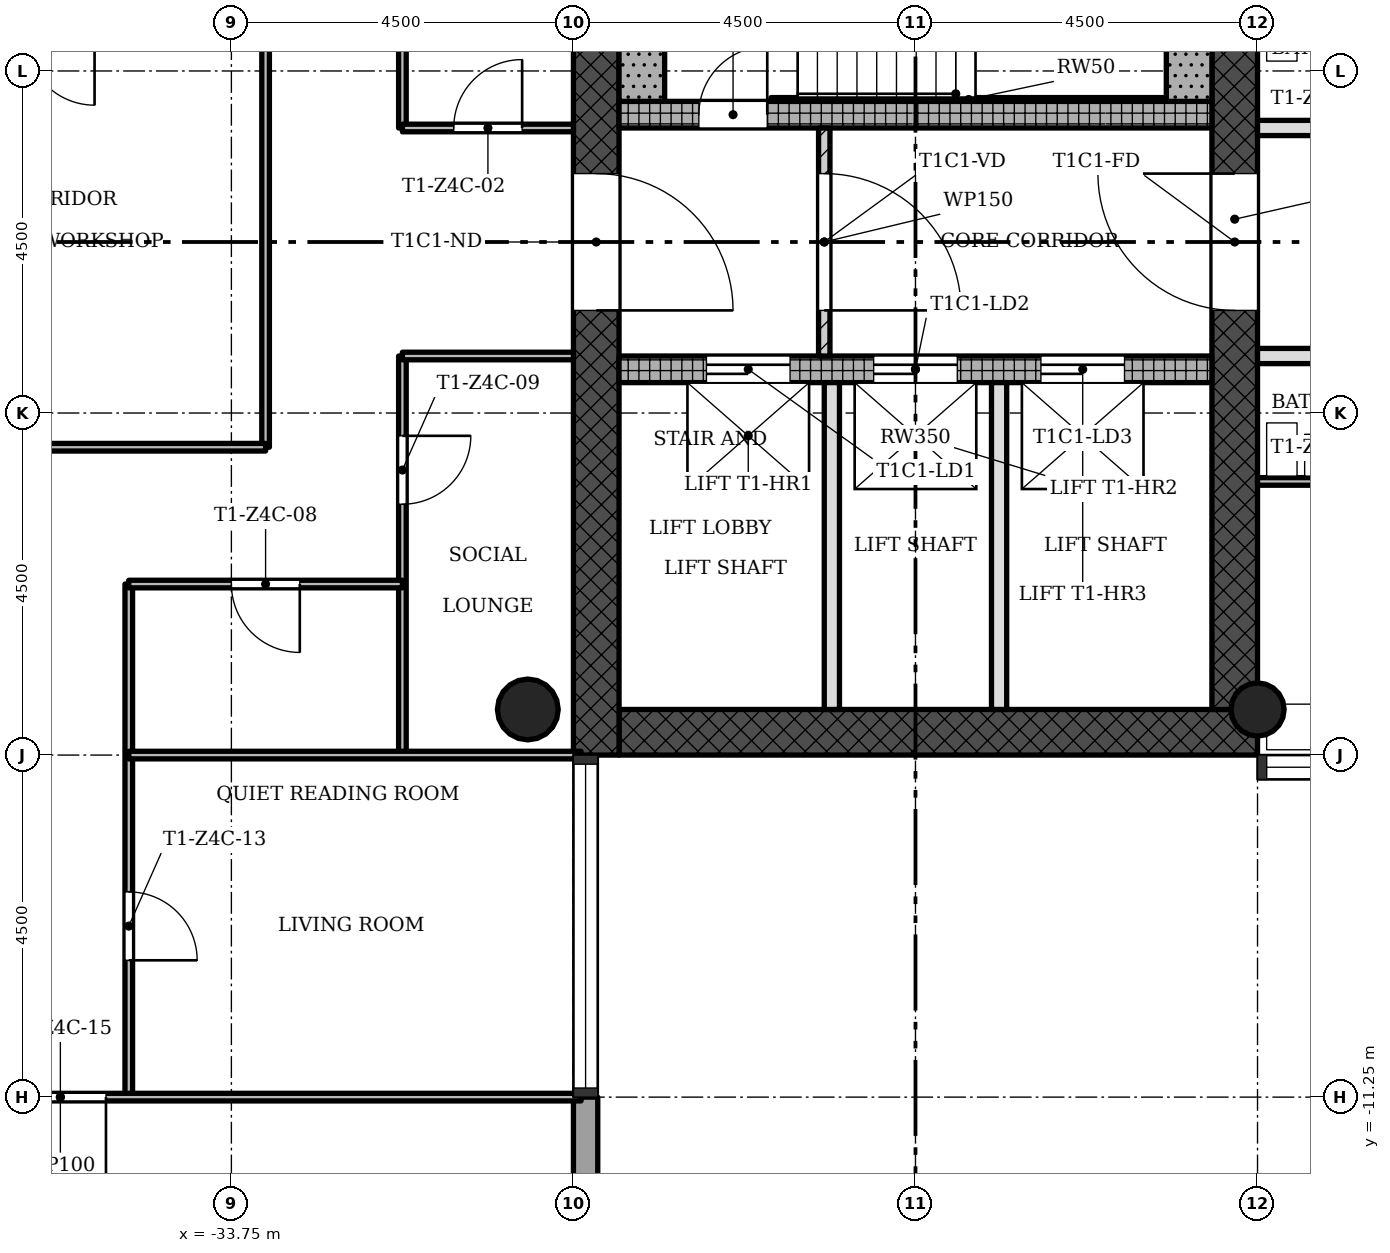
"""IFC4 building model, lengths in metres.
Left out: names, types, materials, properties, quantities, classifications, styles, units other than length and angle.
Written with IfcOpenShell. Run it as: python <this file> out.ifc"""

import sys

from ifc_helpers import new_model, si_unit, direction, frame, frame_2d, origin, origin_2d, place, context, subcontext, project, spatial, rectangle, hollow_circle, extrude, element, fill, save


model = new_model("IFC4")
c1 = context("Model", 3, precision=1e-05, world=origin(), true_north=direction((0.0, 1.0)))
c2 = subcontext(c1, "Body", "Model", "MODEL_VIEW")
j1 = project(units=[si_unit("LENGTHUNIT", "METRE"), si_unit("PLANEANGLEUNIT", "RADIAN")], contexts=[c1])
p1 = place(None, origin())
s1 = spatial("IfcSite", under=j1, at=p1, CompositionType="ELEMENT")
p2 = place(p1, origin())
s2 = spatial("IfcBuilding", under=s1, at=p2, CompositionType="ELEMENT")
p3 = place(p2, frame((0.0, 0.0, 192.6)))
s3 = spatial("IfcBuildingStorey", under=s2, at=p3, CompositionType="ELEMENT", Elevation=192.6)
p4 = place(p3, frame((-28.65, -6.45, 0.0), z_axis=(0.0, 0.0, 1.0), x_axis=(1.0, 0.0, 0.0)))
e1 = element("IfcWall", 1, at=p4, inside=s3, PredefinedType="SHEAR", context=c2, shape_type="SweptSolid", body=[
    extrude(rectangle(XDim=8.4, YDim=0.6, at=frame_2d((4.2, 0.0))), origin(), (0.0, 0.0, 1.0), 3.4),
])
p5 = place(p3, frame((-20.55, -6.15, 0.0), z_axis=(0.0, 0.0, 1.0), x_axis=(0.0, 1.0, 0.0)))
e2 = element("IfcWall", 2, at=p5, inside=s3, PredefinedType="SHEAR", context=c2, shape_type="SweptSolid", body=[
    extrude(rectangle(XDim=12.9, YDim=0.6, at=frame_2d((6.45, 0.0))), origin(), (0.0, 0.0, 1.0), 3.4),
])
p6 = place(p5, frame((5.25, 0.0, 0.0)))
e3 = element("IfcOpeningElement", 3, at=p6, cuts=e2, PredefinedType="OPENING", context=c2, shape_type="SweptSolid", body=[
    extrude(rectangle(XDim=1.8, YDim=2.1, at=frame_2d((0.9, 1.05))), frame((0.0, 0.31, 0.0), z_axis=(0.0, -1.0, 0.0), x_axis=(1.0, 0.0, 0.0)), (0.0, 0.0, 1.0), 0.62),
])
p7 = place(p3, frame((-28.95, 6.15, 0.0), z_axis=(0.0, 0.0, 1.0), x_axis=(0.0, -1.0, 0.0)))
e4 = element("IfcWall", 4, at=p7, inside=s3, PredefinedType="SHEAR", context=c2, shape_type="SweptSolid", body=[
    extrude(rectangle(XDim=12.9, YDim=0.6, at=frame_2d((6.45, 0.0))), origin(), (0.0, 0.0, 1.0), 3.4),
])
p8 = place(p7, frame((5.25, 0.0, 0.0)))
e5 = element("IfcOpeningElement", 5, at=p8, cuts=e4, PredefinedType="OPENING", context=c2, shape_type="SweptSolid", body=[
    extrude(rectangle(XDim=1.8, YDim=2.1, at=frame_2d((0.9, 1.05))), frame((0.0, 0.31, 0.0), z_axis=(0.0, -1.0, 0.0), x_axis=(1.0, 0.0, 0.0)), (0.0, 0.0, 1.0), 0.62),
])
p9 = place(p3, frame((-28.65, -1.675, 0.0), z_axis=(0.0, 0.0, 1.0), x_axis=(1.0, 0.0, 0.0)))
e6 = element("IfcWall", 6, at=p9, inside=s3, PredefinedType="SHEAR", context=c2, shape_type="SweptSolid", body=[
    extrude(rectangle(XDim=7.8, YDim=0.35, at=frame_2d((3.9, 0.0))), origin(), (0.0, 0.0, 1.0), 3.4),
])
p10 = place(p9, frame((1.15, 0.0, 0.0)))
e7 = element("IfcOpeningElement", 7, at=p10, cuts=e6, PredefinedType="OPENING", context=c2, shape_type="SweptSolid", body=[
    extrude(rectangle(XDim=1.1, YDim=2.1, at=frame_2d((0.55, 1.05))), frame((0.0, 0.185, 0.0), z_axis=(0.0, -1.0, 0.0), x_axis=(1.0, 0.0, 0.0)), (0.0, 0.0, 1.0), 0.37),
])
p11 = place(p9, frame((3.35, 0.0, 0.0)))
e8 = element("IfcOpeningElement", 8, at=p11, cuts=e6, PredefinedType="OPENING", context=c2, shape_type="SweptSolid", body=[
    extrude(rectangle(XDim=1.1, YDim=2.1, at=frame_2d((0.55, 1.05))), frame((0.0, 0.185, 0.0), z_axis=(0.0, -1.0, 0.0), x_axis=(1.0, 0.0, 0.0)), (0.0, 0.0, 1.0), 0.37),
])
p12 = place(p9, frame((5.55, 0.0, 0.0)))
e9 = element("IfcOpeningElement", 9, at=p12, cuts=e6, PredefinedType="OPENING", context=c2, shape_type="SweptSolid", body=[
    extrude(rectangle(XDim=1.1, YDim=2.1, at=frame_2d((0.55, 1.05))), frame((0.0, 0.185, 0.0), z_axis=(0.0, -1.0, 0.0), x_axis=(1.0, 0.0, 0.0)), (0.0, 0.0, 1.0), 0.37),
])
p13 = place(p3, frame((-28.65, 1.675, 0.0), z_axis=(0.0, 0.0, 1.0), x_axis=(1.0, 0.0, 0.0)))
e10 = element("IfcWall", 10, at=p13, inside=s3, PredefinedType="SHEAR", context=c2, shape_type="SweptSolid", body=[
    extrude(rectangle(XDim=7.8, YDim=0.35, at=frame_2d((3.9, 0.0))), origin(), (0.0, 0.0, 1.0), 3.4),
])
p14 = place(p13, frame((1.05, 0.0, 0.0)))
e11 = element("IfcOpeningElement", 11, at=p14, cuts=e10, PredefinedType="OPENING", context=c2, shape_type="SweptSolid", body=[
    extrude(rectangle(XDim=0.9, YDim=2.1, at=frame_2d((0.45, 1.05))), frame((0.0, 0.185, 0.0), z_axis=(0.0, -1.0, 0.0), x_axis=(1.0, 0.0, 0.0)), (0.0, 0.0, 1.0), 0.37),
])
p15 = place(p3, frame((-20.25, -6.15, 0.0), z_axis=(0.0, 0.0, 1.0), x_axis=(1.0, 0.0, 0.0)))
e12 = element("IfcColumn", 12, at=p15, inside=s3, PredefinedType="COLUMN", context=c2, shape_type="SweptSolid", body=[
    extrude(hollow_circle(Radius=0.35, WallThickness=0.025, at=origin_2d()), origin(), (0.0, 0.0, 1.0), 3.4),
])
p16 = place(p3, frame((-29.85, -6.15, 0.0), z_axis=(0.0, 0.0, 1.0), x_axis=(1.0, 0.0, 0.0)))
e13 = element("IfcColumn", 13, at=p16, inside=s3, PredefinedType="COLUMN", context=c2, shape_type="SweptSolid", body=[
    extrude(hollow_circle(Radius=0.4, WallThickness=0.028, at=origin_2d()), origin(), (0.0, 0.0, 1.0), 3.4),
])
p17 = place(p3, frame((-29.09, -12.75, -0.3), z_axis=(0.0, 0.0, 1.0), x_axis=(0.0, 1.0, 0.0)))
e14 = element("IfcWall", 14, at=p17, inside=s3, PredefinedType="STANDARD", context=c2, shape_type="SweptSolid", body=[
    extrude(rectangle(XDim=1.5, YDim=0.32, at=frame_2d((0.75, 0.0))), origin(), (0.0, 0.0, 1.0), 3.4),
])
p18 = place(p3, frame((-25.95, -1.5, 0.0), z_axis=(0.0, 0.0, 1.0), x_axis=(0.0, 1.0, 0.0)))
e15 = element("IfcWall", 15, at=p18, inside=s3, PredefinedType="PARTITIONING", context=c2, shape_type="SweptSolid", body=[
    extrude(rectangle(XDim=3.0, YDim=0.15, at=frame_2d((1.5, 0.0))), origin(), (0.0, 0.0, 1.0), 3.0),
])
p19 = place(p18, frame((0.6, 0.0, 0.0)))
e16 = element("IfcOpeningElement", 16, at=p19, cuts=e15, PredefinedType="OPENING", context=c2, shape_type="SweptSolid", body=[
    extrude(rectangle(XDim=1.8, YDim=2.1, at=frame_2d((0.9, 1.05))), frame((0.0, 0.085, 0.0), z_axis=(0.0, -1.0, 0.0), x_axis=(1.0, 0.0, 0.0)), (0.0, 0.0, 1.0), 0.17),
])
for number, where, z_axis, x_axis in (
    (17, (-25.85, -6.15, 0.0), (0.0, 0.0, 1.0), (0.0, 1.0, 0.0)),
    (18, (-23.65, -6.15, 0.0), (0.0, 0.0, 1.0), (0.0, 1.0, 0.0)),
):
    element("IfcWall", number, at=place(p3, frame(where, z_axis=z_axis, x_axis=x_axis)), inside=s3, PredefinedType="SOLIDWALL", context=c2, shape_type="SweptSolid", body=[
        extrude(rectangle(XDim=4.3, YDim=0.2, at=frame_2d((2.15, 0.0))), origin(), (0.0, 0.0, 1.0), 3.0),
    ])
p20 = place(p3, frame((-35.1, -11.25, 0.0), z_axis=(0.0, 0.0, 1.0), x_axis=(0.0, 1.0, 0.0)))
e19 = element("IfcWall", 19, at=p20, inside=s3, PredefinedType="PARTITIONING", context=c2, shape_type="SweptSolid", body=[
    extrude(rectangle(XDim=6.75, YDim=0.1, at=frame_2d((3.375, 0.0))), origin(), (0.0, 0.0, 1.0), 3.0),
])
p21 = place(p20, frame((1.8, 0.0, 0.0)))
e20 = element("IfcOpeningElement", 20, at=p21, cuts=e19, PredefinedType="OPENING", context=c2, shape_type="SweptSolid", body=[
    extrude(rectangle(XDim=0.9, YDim=2.1, at=frame_2d((0.45, 1.05))), frame((0.0, 0.06, 0.0), z_axis=(0.0, -1.0, 0.0), x_axis=(1.0, 0.0, 0.0)), (0.0, 0.0, 1.0), 0.12),
])
p22 = place(p3, frame((-33.3, -2.7, 0.0), z_axis=(0.0, 0.0, 1.0), x_axis=(0.0, 1.0, 0.0)))
e21 = element("IfcWall", 21, at=p22, inside=s3, PredefinedType="PARTITIONING", context=c2, shape_type="SweptSolid", body=[
    extrude(rectangle(XDim=5.4, YDim=0.1, at=frame_2d((2.7, 0.0))), origin(), (0.0, 0.0, 1.0), 3.0),
])
p23 = place(p3, frame((-31.5, -6.75, 0.0), z_axis=(0.0, 0.0, 1.0), x_axis=(0.0, 1.0, 0.0)))
e22 = element("IfcWall", 22, at=p23, inside=s3, PredefinedType="PARTITIONING", context=c2, shape_type="SweptSolid", body=[
    extrude(rectangle(XDim=5.25, YDim=0.1, at=frame_2d((2.625, 0.0))), origin(), (0.0, 0.0, 1.0), 3.0),
])
p24 = place(p23, frame((3.3, 0.0, 0.0)))
e23 = element("IfcOpeningElement", 23, at=p24, cuts=e22, PredefinedType="OPENING", context=c2, shape_type="SweptSolid", body=[
    extrude(rectangle(XDim=0.9, YDim=2.1, at=frame_2d((0.45, 1.05))), frame((0.0, 0.06, 0.0), z_axis=(0.0, -1.0, 0.0), x_axis=(1.0, 0.0, 0.0)), (0.0, 0.0, 1.0), 0.12),
])
p25 = place(p3, frame((-31.5, 1.5, 0.0), z_axis=(0.0, 0.0, 1.0), x_axis=(0.0, 1.0, 0.0)))
e24 = element("IfcWall", 24, at=p25, inside=s3, PredefinedType="PARTITIONING", context=c2, shape_type="SweptSolid", body=[
    extrude(rectangle(XDim=3.0, YDim=0.1, at=frame_2d((1.5, 0.0))), origin(), (0.0, 0.0, 1.0), 3.0),
])
p26 = place(p3, frame((-42.85, -11.25, 0.0), z_axis=(0.0, 0.0, 1.0), x_axis=(1.0, 0.0, 0.0)))
e25 = element("IfcWall", 25, at=p26, inside=s3, PredefinedType="PARTITIONING", context=c2, shape_type="SweptSolid", body=[
    extrude(rectangle(XDim=13.7, YDim=0.1, at=frame_2d((6.85, 0.0))), origin(), (0.0, 0.0, 1.0), 3.0),
])
p27 = place(p26, frame((6.25, 0.0, 0.0)))
e26 = element("IfcOpeningElement", 26, at=p27, cuts=e25, PredefinedType="OPENING", context=c2, shape_type="SweptSolid", body=[
    extrude(rectangle(XDim=1.2, YDim=2.1, at=frame_2d((0.6, 1.05))), frame((0.0, 0.06, 0.0), z_axis=(0.0, -1.0, 0.0), x_axis=(1.0, 0.0, 0.0)), (0.0, 0.0, 1.0), 0.12),
])
p28 = place(p3, frame((-35.1, -6.75, 0.0), z_axis=(0.0, 0.0, 1.0), x_axis=(1.0, 0.0, 0.0)))
e27 = element("IfcWall", 27, at=p28, inside=s3, PredefinedType="PARTITIONING", context=c2, shape_type="SweptSolid", body=[
    extrude(rectangle(XDim=5.95, YDim=0.1, at=frame_2d((2.975, 0.0))), origin(), (0.0, 0.0, 1.0), 3.0),
])
p29 = place(p3, frame((-35.1, -4.5, 0.0), z_axis=(0.0, 0.0, 1.0), x_axis=(1.0, 0.0, 0.0)))
e28 = element("IfcWall", 28, at=p29, inside=s3, PredefinedType="PARTITIONING", context=c2, shape_type="SweptSolid", body=[
    extrude(rectangle(XDim=3.6, YDim=0.1, at=frame_2d((1.8, 0.0))), origin(), (0.0, 0.0, 1.0), 3.0),
])
p30 = place(p29, frame((1.35, 0.0, 0.0)))
e29 = element("IfcOpeningElement", 29, at=p30, cuts=e28, PredefinedType="OPENING", context=c2, shape_type="SweptSolid", body=[
    extrude(rectangle(XDim=0.9, YDim=2.1, at=frame_2d((0.45, 1.05))), frame((0.0, 0.06, 0.0), z_axis=(0.0, -1.0, 0.0), x_axis=(1.0, 0.0, 0.0)), (0.0, 0.0, 1.0), 0.12),
])
p31 = place(p3, frame((-20.25, -3.15, 0.0), z_axis=(0.0, 0.0, 1.0), x_axis=(1.0, 0.0, 0.0)))
e30 = element("IfcWall", 30, at=p31, inside=s3, PredefinedType="PARTITIONING", context=c2, shape_type="SweptSolid", body=[
    extrude(rectangle(XDim=4.5, YDim=0.1, at=frame_2d((2.25, 0.0))), origin(), (0.0, 0.0, 1.0), 3.0),
])
p32 = place(p31, frame((3.0, 0.0, 0.0)))
e31 = element("IfcOpeningElement", 31, at=p32, cuts=e30, PredefinedType="OPENING", context=c2, shape_type="SweptSolid", body=[
    extrude(rectangle(XDim=0.9, YDim=2.1, at=frame_2d((0.45, 1.05))), frame((0.0, 0.06, 0.0), z_axis=(0.0, -1.0, 0.0), x_axis=(1.0, 0.0, 0.0)), (0.0, 0.0, 1.0), 0.12),
])
p33 = place(p3, frame((-38.7, -2.7, 0.0), z_axis=(0.0, 0.0, 1.0), x_axis=(1.0, 0.0, 0.0)))
e32 = element("IfcWall", 32, at=p33, inside=s3, PredefinedType="PARTITIONING", context=c2, shape_type="SweptSolid", body=[
    extrude(rectangle(XDim=5.4, YDim=0.1, at=frame_2d((2.7, 0.0))), origin(), (0.0, 0.0, 1.0), 3.0),
])
p34 = place(p3, frame((-31.5, -1.5, 0.0), z_axis=(0.0, 0.0, 1.0), x_axis=(1.0, 0.0, 0.0)))
e33 = element("IfcWall", 33, at=p34, inside=s3, PredefinedType="PARTITIONING", context=c2, shape_type="SweptSolid", body=[
    extrude(rectangle(XDim=2.25, YDim=0.1, at=frame_2d((1.125, 0.0))), origin(), (0.0, 0.0, 1.0), 3.0),
])
p35 = place(p3, frame((-20.25, -1.5, 0.0), z_axis=(0.0, 0.0, 1.0), x_axis=(1.0, 0.0, 0.0)))
e34 = element("IfcWall", 34, at=p35, inside=s3, PredefinedType="SOLIDWALL", context=c2, shape_type="SweptSolid", body=[
    extrude(rectangle(XDim=4.5, YDim=0.2, at=frame_2d((2.25, 0.0))), origin(), (0.0, 0.0, 1.0), 3.0),
])
p36 = place(p35, frame((3.0, 0.0, 0.0)))
e35 = element("IfcOpeningElement", 35, at=p36, cuts=e34, PredefinedType="OPENING", context=c2, shape_type="SweptSolid", body=[
    extrude(rectangle(XDim=0.9, YDim=2.1, at=frame_2d((0.45, 1.05))), frame((0.0, 0.11, 0.0), z_axis=(0.0, -1.0, 0.0), x_axis=(1.0, 0.0, 0.0)), (0.0, 0.0, 1.0), 0.22),
])
p37 = place(p3, frame((-31.5, 1.5, 0.0), z_axis=(0.0, 0.0, 1.0), x_axis=(1.0, 0.0, 0.0)))
e36 = element("IfcWall", 36, at=p37, inside=s3, PredefinedType="PARTITIONING", context=c2, shape_type="SweptSolid", body=[
    extrude(rectangle(XDim=2.25, YDim=0.1, at=frame_2d((1.125, 0.0))), origin(), (0.0, 0.0, 1.0), 3.0),
])
p38 = place(p37, frame((0.675, 0.0, 0.0)))
e37 = element("IfcOpeningElement", 37, at=p38, cuts=e36, PredefinedType="OPENING", context=c2, shape_type="SweptSolid", body=[
    extrude(rectangle(XDim=0.9, YDim=2.1, at=frame_2d((0.45, 1.05))), frame((0.0, 0.06, 0.0), z_axis=(0.0, -1.0, 0.0), x_axis=(1.0, 0.0, 0.0)), (0.0, 0.0, 1.0), 0.12),
])
p39 = place(p3, frame((-20.25, 1.5, 0.0), z_axis=(0.0, 0.0, 1.0), x_axis=(1.0, 0.0, 0.0)))
e38 = element("IfcWall", 38, at=p39, inside=s3, PredefinedType="SOLIDWALL", context=c2, shape_type="SweptSolid", body=[
    extrude(rectangle(XDim=4.5, YDim=0.2, at=frame_2d((2.25, 0.0))), origin(), (0.0, 0.0, 1.0), 3.0),
])
p40 = place(p39, frame((3.0, 0.0, 0.0)))
e39 = element("IfcOpeningElement", 39, at=p40, cuts=e38, PredefinedType="OPENING", context=c2, shape_type="SweptSolid", body=[
    extrude(rectangle(XDim=0.9, YDim=2.1, at=frame_2d((0.45, 1.05))), frame((0.0, 0.11, 0.0), z_axis=(0.0, -1.0, 0.0), x_axis=(1.0, 0.0, 0.0)), (0.0, 0.0, 1.0), 0.22),
])
for number, where, z_axis, x_axis in (
    (40, (-21.15, 1.85, 0.0), (0.0, 0.0, 1.0), (0.0, 1.0, 0.0)),
    (41, (-28.35, 1.85, 0.0), (0.0, 0.0, 1.0), (0.0, 1.0, 0.0)),
):
    element("IfcWall", number, at=place(p3, frame(where, z_axis=z_axis, x_axis=x_axis)), inside=s3, PredefinedType="SHEAR", context=c2, shape_type="SweptSolid", body=[
        extrude(rectangle(XDim=4.3, YDim=0.6, at=frame_2d((2.15, 0.0))), origin(), (0.0, 0.0, 1.0), 3.4),
    ])
p41 = place(p3, frame((-26.65, 1.875, 0.0), z_axis=(0.0, 0.0, 1.0), x_axis=(1.0, 0.0, 0.0)))
e42 = element("IfcWall", 42, at=p41, inside=s3, PredefinedType="SHEAR", context=c2, shape_type="SweptSolid", body=[
    extrude(rectangle(XDim=5.2, YDim=0.05, at=frame_2d((2.6, 0.0))), origin(), (0.0, 0.0, 1.0), 3.4),
])
p42 = place(p19, origin())
e43 = element("IfcDoor", 43, at=p42, inside=s3, OperationType="SINGLE_SWING_LEFT", PredefinedType="DOOR", context=c2, shape_type="SweptSolid", body=[
    extrude(rectangle(XDim=1.8, YDim=2.1, at=frame_2d((0.9, 1.05))), frame((0.0, 0.025, 0.0), z_axis=(0.0, -1.0, 0.0), x_axis=(1.0, 0.0, 0.0)), (0.0, 0.0, 1.0), 0.05),
])
fill(e16, e43)
p43 = place(p38, origin())
e44 = element("IfcDoor", 44, at=p43, inside=s3, OperationType="SINGLE_SWING_LEFT", PredefinedType="DOOR", context=c2, shape_type="SweptSolid", body=[
    extrude(rectangle(XDim=0.9, YDim=2.1, at=frame_2d((0.45, 1.05))), frame((0.0, 0.025, 0.0), z_axis=(0.0, -1.0, 0.0), x_axis=(1.0, 0.0, 0.0)), (0.0, 0.0, 1.0), 0.05),
])
fill(e37, e44)
p44 = place(p30, origin())
e45 = element("IfcDoor", 45, at=p44, inside=s3, OperationType="SINGLE_SWING_RIGHT", PredefinedType="DOOR", context=c2, shape_type="SweptSolid", body=[
    extrude(rectangle(XDim=0.9, YDim=2.1, at=frame_2d((0.45, 1.05))), frame((0.0, 0.025, 0.0), z_axis=(0.0, -1.0, 0.0), x_axis=(1.0, 0.0, 0.0)), (0.0, 0.0, 1.0), 0.05),
])
fill(e29, e45)
p45 = place(p24, origin())
e46 = element("IfcDoor", 46, at=p45, inside=s3, OperationType="SINGLE_SWING_RIGHT", PredefinedType="DOOR", context=c2, shape_type="SweptSolid", body=[
    extrude(rectangle(XDim=0.9, YDim=2.1, at=frame_2d((0.45, 1.05))), frame((0.0, 0.025, 0.0), z_axis=(0.0, -1.0, 0.0), x_axis=(1.0, 0.0, 0.0)), (0.0, 0.0, 1.0), 0.05),
])
fill(e23, e46)
p46 = place(p21, origin())
e47 = element("IfcDoor", 47, at=p46, inside=s3, OperationType="SINGLE_SWING_LEFT", PredefinedType="DOOR", context=c2, shape_type="SweptSolid", body=[
    extrude(rectangle(XDim=0.9, YDim=2.1, at=frame_2d((0.45, 1.05))), frame((0.0, 0.025, 0.0), z_axis=(0.0, -1.0, 0.0), x_axis=(1.0, 0.0, 0.0)), (0.0, 0.0, 1.0), 0.05),
])
fill(e20, e47)
p47 = place(p27, origin())
e48 = element("IfcDoor", 48, at=p47, inside=s3, OperationType="SINGLE_SWING_RIGHT", PredefinedType="DOOR", context=c2, shape_type="SweptSolid", body=[
    extrude(rectangle(XDim=1.2, YDim=2.1, at=frame_2d((0.6, 1.05))), frame((0.0, 0.025, 0.0), z_axis=(0.0, -1.0, 0.0), x_axis=(1.0, 0.0, 0.0)), (0.0, 0.0, 1.0), 0.05),
])
fill(e26, e48)
p48 = place(p14, origin())
e49 = element("IfcDoor", 49, at=p48, inside=s3, OperationType="SINGLE_SWING_LEFT", PredefinedType="DOOR", context=c2, shape_type="SweptSolid", body=[
    extrude(rectangle(XDim=0.9, YDim=2.1, at=frame_2d((0.45, 1.05))), frame((0.0, 0.025, 0.0), z_axis=(0.0, -1.0, 0.0), x_axis=(1.0, 0.0, 0.0)), (0.0, 0.0, 1.0), 0.05),
])
fill(e11, e49)
p49 = place(p10, origin())
e50 = element("IfcDoor", 50, at=p49, inside=s3, OperationType="SLIDING_TO_LEFT", PredefinedType="DOOR", context=c2, shape_type="SweptSolid", body=[
    extrude(rectangle(XDim=1.1, YDim=2.1, at=frame_2d((0.55, 1.05))), frame((0.0, 0.025, 0.0), z_axis=(0.0, -1.0, 0.0), x_axis=(1.0, 0.0, 0.0)), (0.0, 0.0, 1.0), 0.05),
])
fill(e7, e50)
p50 = place(p11, origin())
e51 = element("IfcDoor", 51, at=p50, inside=s3, OperationType="SLIDING_TO_LEFT", PredefinedType="DOOR", context=c2, shape_type="SweptSolid", body=[
    extrude(rectangle(XDim=1.1, YDim=2.1, at=frame_2d((0.55, 1.05))), frame((0.0, 0.025, 0.0), z_axis=(0.0, -1.0, 0.0), x_axis=(1.0, 0.0, 0.0)), (0.0, 0.0, 1.0), 0.05),
])
fill(e8, e51)
p51 = place(p12, origin())
e52 = element("IfcDoor", 52, at=p51, inside=s3, OperationType="SLIDING_TO_LEFT", PredefinedType="DOOR", context=c2, shape_type="SweptSolid", body=[
    extrude(rectangle(XDim=1.1, YDim=2.1, at=frame_2d((0.55, 1.05))), frame((0.0, 0.025, 0.0), z_axis=(0.0, -1.0, 0.0), x_axis=(1.0, 0.0, 0.0)), (0.0, 0.0, 1.0), 0.05),
])
fill(e9, e52)
p52 = place(p8, origin())
e53 = element("IfcDoor", 53, at=p52, inside=s3, OperationType="SINGLE_SWING_LEFT", PredefinedType="DOOR", context=c2, shape_type="SweptSolid", body=[
    extrude(rectangle(XDim=1.8, YDim=2.1, at=frame_2d((0.9, 1.05))), frame((0.0, 0.025, 0.0), z_axis=(0.0, -1.0, 0.0), x_axis=(1.0, 0.0, 0.0)), (0.0, 0.0, 1.0), 0.05),
])
fill(e5, e53)
p53 = place(p6, origin())
e54 = element("IfcDoor", 54, at=p53, inside=s3, OperationType="SINGLE_SWING_LEFT", PredefinedType="DOOR", context=c2, shape_type="SweptSolid", body=[
    extrude(rectangle(XDim=1.8, YDim=2.1, at=frame_2d((0.9, 1.05))), frame((0.0, 0.025, 0.0), z_axis=(0.0, -1.0, 0.0), x_axis=(1.0, 0.0, 0.0)), (0.0, 0.0, 1.0), 0.05),
])
fill(e3, e54)
save(model, sys.argv[1])
